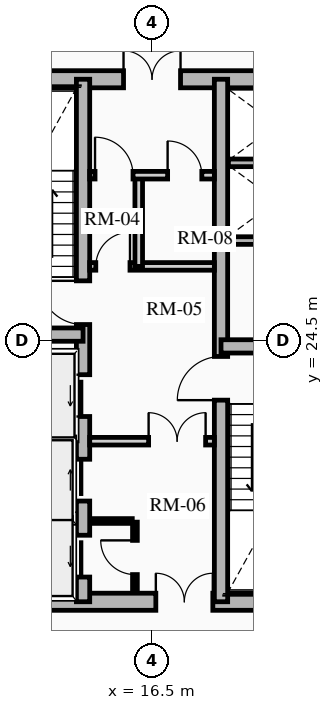
"""IFC4 building model, lengths in metres.
Left out: names, types, materials, properties, quantities, classifications, styles, units other than length and angle.
Written with IfcOpenShell. Run it as: python <this file> out.ifc"""

import sys

from ifc_helpers import new_model, si_unit, direction, frame, frame_2d, origin, place, context, subcontext, project, spatial, rectangle, extrude, source, transform, mapped, element, fill, save


model = new_model("IFC4")
c1 = context("Model", 3, precision=1e-05, world=origin(), true_north=direction((0.0, 1.0)))
c2 = subcontext(c1, "Body", "Model", "MODEL_VIEW")
j1 = project(units=[si_unit("LENGTHUNIT", "METRE"), si_unit("PLANEANGLEUNIT", "RADIAN")], contexts=[c1])
p1 = place(None, origin())
s1 = spatial("IfcSite", under=j1, at=p1, CompositionType="ELEMENT")
p2 = place(p1, origin())
s2 = spatial("IfcBuilding", under=s1, at=p2, CompositionType="ELEMENT")
p3 = place(p2, frame((0.0, 0.0, 132.88)))
s3 = spatial("IfcBuildingStorey", under=s2, at=p3, CompositionType="ELEMENT", Elevation=132.88)
p4 = place(p3, frame((11.15, 17.625, 0.0), z_axis=(0.0, 0.0, 1.0), x_axis=(1.0, 0.0, 0.0)))
e1 = element("IfcWall", 1, at=p4, inside=s3, PredefinedType="SHEAR", context=c2, shape_type="SweptSolid", body=[
    extrude(rectangle(XDim=10.7, YDim=0.45, at=frame_2d((5.35, 0.0))), origin(), (0.0, 0.0, 1.0), 3.72),
])
m1 = source(origin(), c2, "Body", "SweptSolid", [
    extrude(rectangle(XDim=1.5, YDim=2.02, at=frame_2d((0.75, 1.01))), frame((0.0, 0.235, 0.0), z_axis=(0.0, -1.0, 0.0), x_axis=(1.0, 0.0, 0.0)), (0.0, 0.0, 1.0), 0.47),
])
p5 = place(p4, frame((5.45, 0.0, 0.0)))
e2 = element("IfcOpeningElement", 2, at=p5, cuts=e1, PredefinedType="OPENING", context=c2, shape_type="MappedRepresentation", body=[
    mapped(m1, transform((0.0, 0.0, 0.0), x_axis=(1.0, 0.0, 0.0), y_axis=(0.0, 1.0, 0.0), z_axis=(0.0, 0.0, 1.0), scale=1.0)),
])
p6 = place(p3, frame((11.15, 31.375, 0.0), z_axis=(0.0, 0.0, 1.0), x_axis=(1.0, 0.0, 0.0)))
e3 = element("IfcWall", 3, at=p6, inside=s3, PredefinedType="SHEAR", context=c2, shape_type="SweptSolid", body=[
    extrude(rectangle(XDim=10.7, YDim=0.45, at=frame_2d((5.35, 0.0))), origin(), (0.0, 0.0, 1.0), 3.72),
])
p7 = place(p6, frame((4.6, 0.0, 0.0)))
e4 = element("IfcOpeningElement", 4, at=p7, cuts=e3, PredefinedType="OPENING", context=c2, shape_type="MappedRepresentation", body=[
    mapped(m1, transform((0.0, 0.0, 0.0), x_axis=(1.0, 0.0, 0.0), y_axis=(0.0, 1.0, 0.0), z_axis=(0.0, 0.0, 1.0), scale=1.0)),
])
p8 = place(p3, frame((14.685, 17.625, 0.0), z_axis=(0.0, 0.0, 1.0), x_axis=(0.0, 1.0, 0.0)))
e5 = element("IfcWall", 5, at=p8, inside=s3, PredefinedType="SHEAR", context=c2, shape_type="SweptSolid", body=[
    extrude(rectangle(XDim=13.75, YDim=0.35, at=frame_2d((6.875, 0.0))), origin(), (0.0, 0.0, 1.0), 3.72),
])
m2 = source(origin(), c2, "Body", "SweptSolid", [
    extrude(rectangle(XDim=1.1, YDim=2.015, at=frame_2d((0.55, 1.007))), frame((0.0, 0.185, 0.0), z_axis=(0.0, -1.0, 0.0), x_axis=(1.0, 0.0, 0.0)), (0.0, 0.0, 1.0), 0.37),
])
p9 = place(p8, frame((4.875, 0.0, 0.0)))
e6 = element("IfcOpeningElement", 6, at=p9, cuts=e5, PredefinedType="OPENING", context=c2, shape_type="MappedRepresentation", body=[
    mapped(m2, transform((0.0, 0.0, 0.0), x_axis=(1.0, 0.0, 0.0), y_axis=(0.0, 1.0, 0.0), z_axis=(0.0, 0.0, 1.0), scale=1.0)),
])
p10 = place(p8, frame((0.65, 0.0, 0.0)))
e7 = element("IfcOpeningElement", 7, at=p10, cuts=e5, PredefinedType="OPENING", context=c2, shape_type="MappedRepresentation", body=[
    mapped(m2, transform((0.0, 0.0, 0.0), x_axis=(1.0, 0.0, 0.0), y_axis=(0.0, 1.0, 0.0), z_axis=(0.0, 0.0, 1.0), scale=1.0)),
])
p11 = place(p8, frame((2.65, 0.0, 0.0)))
e8 = element("IfcOpeningElement", 8, at=p11, cuts=e5, PredefinedType="OPENING", context=c2, shape_type="MappedRepresentation", body=[
    mapped(m2, transform((0.0, 0.0, 0.0), x_axis=(1.0, 0.0, 0.0), y_axis=(0.0, 1.0, 0.0), z_axis=(0.0, 0.0, 1.0), scale=1.0)),
])
m3 = source(origin(), c2, "Body", "SweptSolid", [
    extrude(rectangle(XDim=1.15, YDim=2.02, at=frame_2d((0.575, 1.01))), frame((0.0, 0.185, 0.0), z_axis=(0.0, -1.0, 0.0), x_axis=(1.0, 0.0, 0.0)), (0.0, 0.0, 1.0), 0.37),
])
p12 = place(p8, frame((7.295, 0.0, 0.0)))
e9 = element("IfcOpeningElement", 9, at=p12, cuts=e5, PredefinedType="OPENING", context=c2, shape_type="MappedRepresentation", body=[
    mapped(m3, transform((0.0, 0.0, 0.0), x_axis=(1.0, 0.0, 0.0), y_axis=(0.0, 1.0, 0.0), z_axis=(0.0, 0.0, 1.0), scale=1.0)),
])
p13 = place(p3, frame((18.315, 17.625, 0.0), z_axis=(0.0, 0.0, 1.0), x_axis=(0.0, 1.0, 0.0)))
e10 = element("IfcWall", 10, at=p13, inside=s3, PredefinedType="SHEAR", context=c2, shape_type="SweptSolid", body=[
    extrude(rectangle(XDim=13.75, YDim=0.35, at=frame_2d((6.875, 0.0))), origin(), (0.0, 0.0, 1.0), 3.72),
])
p14 = place(p13, frame((5.305, 0.0, 0.0)))
e11 = element("IfcOpeningElement", 11, at=p14, cuts=e10, PredefinedType="OPENING", context=c2, shape_type="MappedRepresentation", body=[
    mapped(m3, transform((0.0, 0.0, 0.0), x_axis=(1.0, 0.0, 0.0), y_axis=(0.0, 1.0, 0.0), z_axis=(0.0, 0.0, 1.0), scale=1.0)),
])
for number, where, z_axis, x_axis in (
    (12, (11.4, 24.655, 0.0), (0.0, 0.0, 1.0), (1.0, 0.0, 0.0)),
    (13, (18.315, 24.345, 0.0), (0.0, 0.0, 1.0), (1.0, 0.0, 0.0)),
):
    element("IfcWall", number, at=place(p3, frame(where, z_axis=z_axis, x_axis=x_axis)), inside=s3, PredefinedType="SHEAR", context=c2, shape_type="SweptSolid", body=[
        extrude(rectangle(XDim=3.285, YDim=0.35, at=frame_2d((1.643, 0.0))), origin(), (0.0, 0.0, 1.0), 3.72),
    ])
for number, where, z_axis, x_axis in (
    (14, (11.52, 21.8, 0.0), (0.0, 0.0, 1.0), (1.0, 0.0, 0.0)),
    (15, (11.52, 19.825, 0.0), (0.0, 0.0, 1.0), (1.0, 0.0, 0.0)),
    (16, (18.51, 27.13, 0.0), (0.0, 0.0, 1.0), (1.0, 0.0, 0.0)),
    (17, (18.51, 29.175, 0.0), (0.0, 0.0, 1.0), (1.0, 0.0, 0.0)),
):
    element("IfcWall", number, at=place(p3, frame(where, z_axis=z_axis, x_axis=x_axis)), inside=s3, PredefinedType="SHEAR", context=c2, shape_type="SweptSolid", body=[
        extrude(rectangle(XDim=2.97, YDim=0.2, at=frame_2d((1.485, 0.0))), origin(), (0.0, 0.0, 1.0), 3.72),
    ])
p15 = place(p3, frame((14.86, 21.85, 0.0), z_axis=(0.0, 0.0, 1.0), x_axis=(1.0, 0.0, 0.0)))
e18 = element("IfcWall", 18, at=p15, inside=s3, PredefinedType="PARTITIONING", context=c2, shape_type="SweptSolid", body=[
    extrude(rectangle(XDim=3.28, YDim=0.2, at=frame_2d((1.64, 0.0))), origin(), (0.0, 0.0, 1.0), 3.425),
])
m4 = source(origin(), c2, "Body", "SweptSolid", [
    extrude(rectangle(XDim=1.5, YDim=2.02, at=frame_2d((0.75, 1.01))), frame((0.0, 0.11, 0.0), z_axis=(0.0, -1.0, 0.0), x_axis=(1.0, 0.0, 0.0)), (0.0, 0.0, 1.0), 0.22),
])
p16 = place(p15, frame((1.55, 0.0, 0.0)))
e19 = element("IfcOpeningElement", 19, at=p16, cuts=e18, PredefinedType="OPENING", context=c2, shape_type="MappedRepresentation", body=[
    mapped(m4, transform((0.0, 0.0, 0.0), x_axis=(1.0, 0.0, 0.0), y_axis=(0.0, 1.0, 0.0), z_axis=(0.0, 0.0, 1.0), scale=1.0)),
])
p17 = place(p3, frame((14.86, 26.45, 0.0), z_axis=(0.0, 0.0, 1.0), x_axis=(1.0, 0.0, 0.0)))
e20 = element("IfcWall", 20, at=p17, inside=s3, PredefinedType="PARTITIONING", context=c2, shape_type="SweptSolid", body=[
    extrude(rectangle(XDim=3.28, YDim=0.2, at=frame_2d((1.64, 0.0))), origin(), (0.0, 0.0, 1.0), 3.425),
])
m5 = source(origin(), c2, "Body", "SweptSolid", [
    extrude(rectangle(XDim=0.9, YDim=2.005, at=frame_2d((0.45, 1.002))), frame((0.0, 0.11, 0.0), z_axis=(0.0, -1.0, 0.0), x_axis=(1.0, 0.0, 0.0)), (0.0, 0.0, 1.0), 0.22),
])
p18 = place(p17, frame((0.16, 0.0, 0.0)))
e21 = element("IfcOpeningElement", 21, at=p18, cuts=e20, PredefinedType="OPENING", context=c2, shape_type="MappedRepresentation", body=[
    mapped(m5, transform((0.0, 0.0, 0.0), x_axis=(1.0, 0.0, 0.0), y_axis=(0.0, 1.0, 0.0), z_axis=(0.0, 0.0, 1.0), scale=1.0)),
])
p19 = place(p3, frame((16.15, 26.45, 0.0), z_axis=(0.0, 0.0, 1.0), x_axis=(0.0, 1.0, 0.0)))
e22 = element("IfcWall", 22, at=p19, inside=s3, PredefinedType="PARTITIONING", context=c2, shape_type="SweptSolid", body=[
    extrude(rectangle(XDim=2.4, YDim=0.2, at=frame_2d((1.2, 0.0))), origin(), (0.0, 0.0, 1.0), 3.425),
])
p20 = place(p3, frame((14.86, 28.85, 0.0), z_axis=(0.0, 0.0, 1.0), x_axis=(1.0, 0.0, 0.0)))
e23 = element("IfcWall", 23, at=p20, inside=s3, PredefinedType="PARTITIONING", context=c2, shape_type="SweptSolid", body=[
    extrude(rectangle(XDim=3.28, YDim=0.2, at=frame_2d((1.64, 0.0))), origin(), (0.0, 0.0, 1.0), 3.425),
])
m6 = source(origin(), c2, "Body", "SweptSolid", [
    extrude(rectangle(XDim=1.0, YDim=2.015, at=frame_2d((0.5, 1.007))), frame((0.0, 0.11, 0.0), z_axis=(0.0, -1.0, 0.0), x_axis=(1.0, 0.0, 0.0)), (0.0, 0.0, 1.0), 0.22),
])
p21 = place(p20, frame((0.14, 0.0, 0.0)))
e24 = element("IfcOpeningElement", 24, at=p21, cuts=e23, PredefinedType="OPENING", context=c2, shape_type="MappedRepresentation", body=[
    mapped(m6, transform((0.0, 0.0, 0.0), x_axis=(1.0, 0.0, 0.0), y_axis=(0.0, 1.0, 0.0), z_axis=(0.0, 0.0, 1.0), scale=1.0)),
])
p22 = place(p20, frame((2.05, 0.0, 0.0)))
e25 = element("IfcOpeningElement", 25, at=p22, cuts=e23, PredefinedType="OPENING", context=c2, shape_type="MappedRepresentation", body=[
    mapped(m5, transform((0.0, 0.0, 0.0), x_axis=(1.0, 0.0, 0.0), y_axis=(0.0, 1.0, 0.0), z_axis=(0.0, 0.0, 1.0), scale=1.0)),
])
p23 = place(p3, frame((16.05, 17.92, 0.0), z_axis=(0.0, 0.0, 1.0), x_axis=(0.0, 1.0, 0.0)))
e26 = element("IfcWall", 26, at=p23, inside=s3, PredefinedType="PARTITIONING", context=c2, shape_type="SweptSolid", body=[
    extrude(rectangle(XDim=1.8, YDim=0.125, at=frame_2d((0.9, 0.0))), origin(), (0.0, 0.0, 1.0), 3.425),
])
m7 = source(origin(), c2, "Body", "SweptSolid", [
    extrude(rectangle(XDim=0.9, YDim=2.005, at=frame_2d((0.45, 1.002))), frame((0.0, 0.073, 0.0), z_axis=(0.0, -1.0, 0.0), x_axis=(1.0, 0.0, 0.0)), (0.0, 0.0, 1.0), 0.145),
])
p24 = place(p23, frame((0.42, 0.0, 0.0)))
e27 = element("IfcOpeningElement", 27, at=p24, cuts=e26, PredefinedType="OPENING", context=c2, shape_type="MappedRepresentation", body=[
    mapped(m7, transform((0.0, 0.0, 0.0), x_axis=(1.0, 0.0, 0.0), y_axis=(0.0, 1.0, 0.0), z_axis=(0.0, 0.0, 1.0), scale=1.0)),
])
p25 = place(p3, frame((14.88, 19.75, 0.0), z_axis=(0.0, 0.0, 1.0), x_axis=(1.0, 0.0, 0.0)))
e28 = element("IfcWall", 28, at=p25, inside=s3, PredefinedType="PARTITIONING", context=c2, shape_type="SweptSolid", body=[
    extrude(rectangle(XDim=1.1, YDim=0.125, at=frame_2d((0.55, 0.0))), origin(), (0.0, 0.0, 1.0), 3.425),
])
m8 = source(origin(), c2, "Body", "SweptSolid", [
    extrude(rectangle(XDim=1.1, YDim=2.015, at=frame_2d((0.55, 1.007))), frame((0.0, 0.025, 0.0), z_axis=(0.0, -1.0, 0.0), x_axis=(1.0, 0.0, 0.0)), (0.0, 0.0, 1.0), 0.05),
])
p26 = place(p9, origin())
e29 = element("IfcDoor", 29, at=p26, inside=s3, OperationType="SLIDING_TO_LEFT", PredefinedType="DOOR", context=c2, shape_type="MappedRepresentation", body=[
    mapped(m8, transform((0.0, 0.0, 0.0), x_axis=(1.0, 0.0, 0.0), y_axis=(0.0, 1.0, 0.0), z_axis=(0.0, 0.0, 1.0), scale=1.0)),
])
fill(e6, e29)
p27 = place(p10, origin())
e30 = element("IfcDoor", 30, at=p27, inside=s3, OperationType="SLIDING_TO_LEFT", PredefinedType="DOOR", context=c2, shape_type="MappedRepresentation", body=[
    mapped(m8, transform((0.0, 0.0, 0.0), x_axis=(1.0, 0.0, 0.0), y_axis=(0.0, 1.0, 0.0), z_axis=(0.0, 0.0, 1.0), scale=1.0)),
])
fill(e7, e30)
p28 = place(p11, origin())
e31 = element("IfcDoor", 31, at=p28, inside=s3, OperationType="SLIDING_TO_RIGHT", PredefinedType="DOOR", context=c2, shape_type="MappedRepresentation", body=[
    mapped(m8, transform((0.0, 0.0, 0.0), x_axis=(1.0, 0.0, 0.0), y_axis=(0.0, 1.0, 0.0), z_axis=(0.0, 0.0, 1.0), scale=1.0)),
])
fill(e8, e31)
m9 = source(origin(), c2, "Body", "SweptSolid", [
    extrude(rectangle(XDim=1.15, YDim=2.02, at=frame_2d((0.575, 1.01))), frame((0.0, 0.025, 0.0), z_axis=(0.0, -1.0, 0.0), x_axis=(1.0, 0.0, 0.0)), (0.0, 0.0, 1.0), 0.05),
])
p29 = place(p12, origin())
e32 = element("IfcDoor", 32, at=p29, inside=s3, OperationType="SINGLE_SWING_RIGHT", PredefinedType="DOOR", context=c2, shape_type="MappedRepresentation", body=[
    mapped(m9, transform((0.0, 0.0, 0.0), x_axis=(1.0, 0.0, 0.0), y_axis=(0.0, 1.0, 0.0), z_axis=(0.0, 0.0, 1.0), scale=1.0)),
])
fill(e9, e32)
p30 = place(p14, origin())
e33 = element("IfcDoor", 33, at=p30, inside=s3, OperationType="SINGLE_SWING_LEFT", PredefinedType="DOOR", context=c2, shape_type="MappedRepresentation", body=[
    mapped(m9, transform((0.0, 0.0, 0.0), x_axis=(1.0, 0.0, 0.0), y_axis=(0.0, 1.0, 0.0), z_axis=(0.0, 0.0, 1.0), scale=1.0)),
])
fill(e11, e33)
m10 = source(origin(), c2, "Body", "SweptSolid", [
    extrude(rectangle(XDim=1.5, YDim=2.02, at=frame_2d((0.75, 1.01))), frame((0.0, 0.025, 0.0), z_axis=(0.0, -1.0, 0.0), x_axis=(1.0, 0.0, 0.0)), (0.0, 0.0, 1.0), 0.05),
])
p31 = place(p7, origin())
e34 = element("IfcDoor", 34, at=p31, inside=s3, OperationType="DOUBLE_DOOR_SINGLE_SWING", PredefinedType="DOOR", context=c2, shape_type="MappedRepresentation", body=[
    mapped(m10, transform((0.0, 0.0, 0.0), x_axis=(1.0, 0.0, 0.0), y_axis=(0.0, 1.0, 0.0), z_axis=(0.0, 0.0, 1.0), scale=1.0)),
])
fill(e4, e34)
p32 = place(p5, origin())
e35 = element("IfcDoor", 35, at=p32, inside=s3, OperationType="DOUBLE_DOOR_SINGLE_SWING", PredefinedType="DOOR", context=c2, shape_type="MappedRepresentation", body=[
    mapped(m10, transform((0.0, 0.0, 0.0), x_axis=(1.0, 0.0, 0.0), y_axis=(0.0, 1.0, 0.0), z_axis=(0.0, 0.0, 1.0), scale=1.0)),
])
fill(e2, e35)
p33 = place(p16, origin())
e36 = element("IfcDoor", 36, at=p33, inside=s3, OperationType="DOUBLE_DOOR_SINGLE_SWING", PredefinedType="DOOR", context=c2, shape_type="MappedRepresentation", body=[
    mapped(m10, transform((0.0, 0.0, 0.0), x_axis=(1.0, 0.0, 0.0), y_axis=(0.0, 1.0, 0.0), z_axis=(0.0, 0.0, 1.0), scale=1.0)),
])
fill(e19, e36)
m11 = source(origin(), c2, "Body", "SweptSolid", [
    extrude(rectangle(XDim=0.9, YDim=2.005, at=frame_2d((0.45, 1.002))), frame((0.0, 0.025, 0.0), z_axis=(0.0, -1.0, 0.0), x_axis=(1.0, 0.0, 0.0)), (0.0, 0.0, 1.0), 0.05),
])
p34 = place(p18, origin())
e37 = element("IfcDoor", 37, at=p34, inside=s3, OperationType="SINGLE_SWING_RIGHT", PredefinedType="DOOR", context=c2, shape_type="MappedRepresentation", body=[
    mapped(m11, transform((0.0, 0.0, 0.0), x_axis=(1.0, 0.0, 0.0), y_axis=(0.0, 1.0, 0.0), z_axis=(0.0, 0.0, 1.0), scale=1.0)),
])
fill(e21, e37)
m12 = source(origin(), c2, "Body", "SweptSolid", [
    extrude(rectangle(XDim=1.0, YDim=2.015, at=frame_2d((0.5, 1.007))), frame((0.0, 0.025, 0.0), z_axis=(0.0, -1.0, 0.0), x_axis=(1.0, 0.0, 0.0)), (0.0, 0.0, 1.0), 0.05),
])
p35 = place(p21, origin())
e38 = element("IfcDoor", 38, at=p35, inside=s3, OperationType="SINGLE_SWING_LEFT", PredefinedType="DOOR", context=c2, shape_type="MappedRepresentation", body=[
    mapped(m12, transform((0.0, 0.0, 0.0), x_axis=(1.0, 0.0, 0.0), y_axis=(0.0, 1.0, 0.0), z_axis=(0.0, 0.0, 1.0), scale=1.0)),
])
fill(e24, e38)
p36 = place(p24, origin())
e39 = element("IfcDoor", 39, at=p36, inside=s3, OperationType="SINGLE_SWING_RIGHT", PredefinedType="DOOR", context=c2, shape_type="MappedRepresentation", body=[
    mapped(m11, transform((0.0, 0.0, 0.0), x_axis=(1.0, 0.0, 0.0), y_axis=(0.0, 1.0, 0.0), z_axis=(0.0, 0.0, 1.0), scale=1.0)),
])
fill(e27, e39)
p37 = place(p22, origin())
e40 = element("IfcDoor", 40, at=p37, inside=s3, OperationType="SINGLE_SWING_LEFT", PredefinedType="DOOR", context=c2, shape_type="MappedRepresentation", body=[
    mapped(m11, transform((0.0, 0.0, 0.0), x_axis=(1.0, 0.0, 0.0), y_axis=(0.0, 1.0, 0.0), z_axis=(0.0, 0.0, 1.0), scale=1.0)),
])
fill(e25, e40)
save(model, sys.argv[1])
